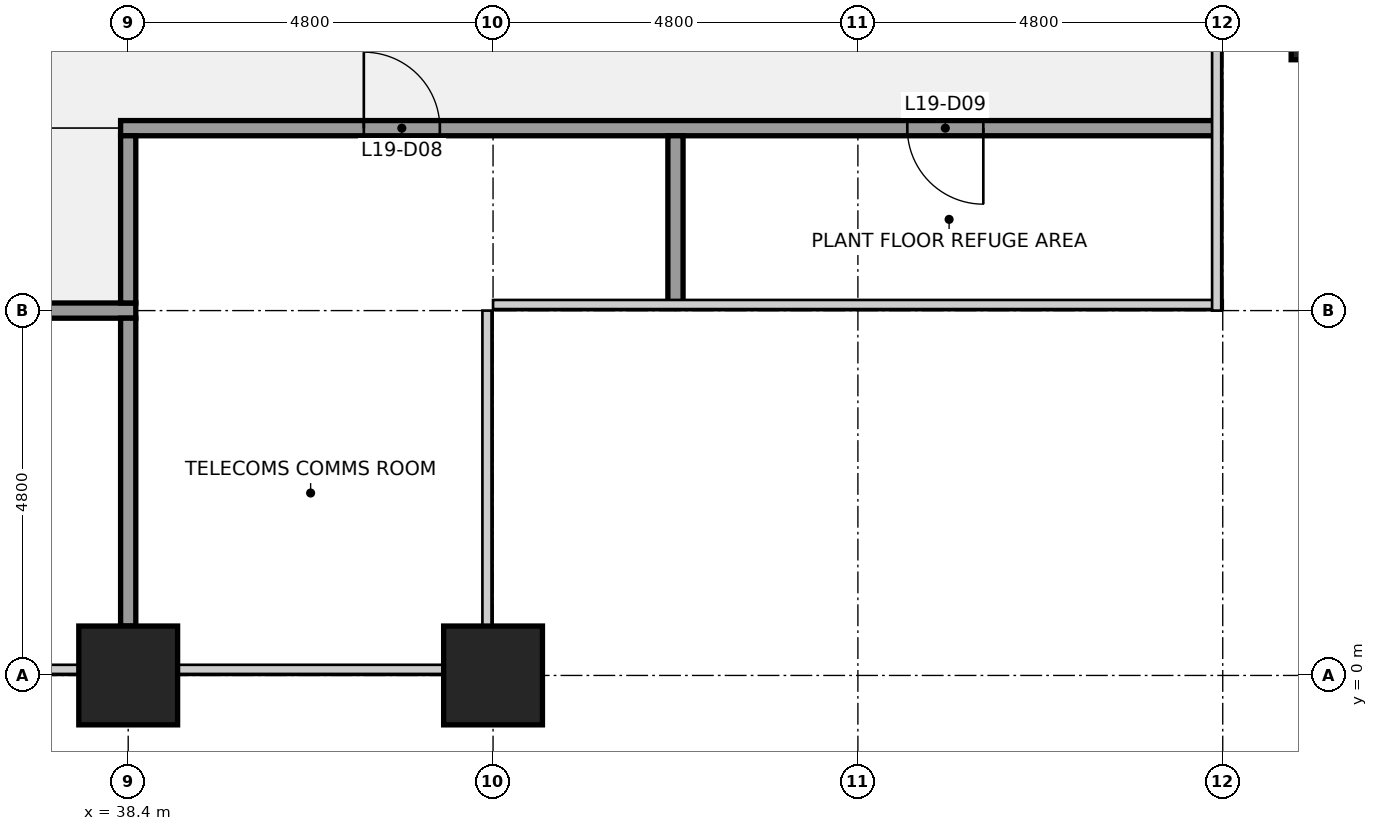
"""IFC4 building model, lengths in metres.
Left out: names, types, materials, properties, quantities, classifications, styles, units other than length and angle.
Written with IfcOpenShell. Run it as: python <this file> out.ifc"""

import sys

from ifc_helpers import new_model, si_unit, direction, frame, frame_2d, origin, origin_2d, place, context, subcontext, project, spatial, rectangle, extrude, element, fill, save


model = new_model("IFC4")
c1 = context("Model", 3, precision=1e-05, world=origin(), true_north=direction((0.0, 1.0)))
c2 = subcontext(c1, "Body", "Model", "MODEL_VIEW")
j1 = project(units=[si_unit("LENGTHUNIT", "METRE"), si_unit("PLANEANGLEUNIT", "RADIAN")], contexts=[c1])
p1 = place(None, origin())
s1 = spatial("IfcSite", under=j1, at=p1, CompositionType="ELEMENT")
p2 = place(p1, origin())
s2 = spatial("IfcBuilding", under=s1, at=p2, CompositionType="ELEMENT")
p3 = place(p2, frame((0.0, 0.0, 87.0)))
s3 = spatial("IfcBuildingStorey", under=s2, at=p3, CompositionType="ELEMENT", Elevation=87.0)
for number, where, z_axis, x_axis in (
    (1, (38.4, 0.0, 0.0), (0.0, 0.0, 1.0), (1.0, 0.0, 0.0)),
    (2, (43.2, 0.0, 0.0), (0.0, 0.0, 1.0), (1.0, 0.0, 0.0)),
):
    element("IfcColumn", number, at=place(p3, frame(where, z_axis=z_axis, x_axis=x_axis)), inside=s3, PredefinedType="COLUMN", context=c2, shape_type="SweptSolid", body=[
        extrude(rectangle(XDim=1.3, YDim=1.3, at=origin_2d()), origin(), (0.0, 0.0, 1.0), 4.5),
    ])
p4 = place(p3, frame((19.1, 4.8, 0.0), z_axis=(0.0, 0.0, 1.0), x_axis=(1.0, 0.0, 0.0)))
e3 = element("IfcWall", 3, at=p4, inside=s3, PredefinedType="PARTITIONING", context=c2, shape_type="SweptSolid", body=[
    extrude(rectangle(XDim=19.4, YDim=0.2, at=frame_2d((9.7, 0.0))), origin(), (0.0, 0.0, 1.0), 2.993),
])
p5 = place(p4, frame((3.2, 0.0, 0.0)))
e4 = element("IfcOpeningElement", 4, at=p5, cuts=e3, PredefinedType="OPENING", context=c2, shape_type="SweptSolid", body=[
    extrude(rectangle(XDim=1.0, YDim=2.1, at=frame_2d((0.5, 1.05))), frame((0.0, 0.11, 0.0), z_axis=(0.0, -1.0, 0.0), x_axis=(1.0, 0.0, 0.0)), (0.0, 0.0, 1.0), 0.22),
])
p6 = place(p4, frame((9.2, 0.0, 0.0)))
e5 = element("IfcOpeningElement", 5, at=p6, cuts=e3, PredefinedType="OPENING", context=c2, shape_type="SweptSolid", body=[
    extrude(rectangle(XDim=1.0, YDim=2.1, at=frame_2d((0.5, 1.05))), frame((0.0, 0.11, 0.0), z_axis=(0.0, -1.0, 0.0), x_axis=(1.0, 0.0, 0.0)), (0.0, 0.0, 1.0), 0.22),
])
p7 = place(p4, frame((15.2, 0.0, 0.0)))
e6 = element("IfcOpeningElement", 6, at=p7, cuts=e3, PredefinedType="OPENING", context=c2, shape_type="SweptSolid", body=[
    extrude(rectangle(XDim=1.0, YDim=2.1, at=frame_2d((0.5, 1.05))), frame((0.0, 0.11, 0.0), z_axis=(0.0, -1.0, 0.0), x_axis=(1.0, 0.0, 0.0)), (0.0, 0.0, 1.0), 0.22),
])
p8 = place(p3, frame((38.3, 7.2, 0.0), z_axis=(0.0, 0.0, 1.0), x_axis=(1.0, 0.0, 0.0)))
e7 = element("IfcWall", 7, at=p8, inside=s3, PredefinedType="PARTITIONING", context=c2, shape_type="SweptSolid", body=[
    extrude(rectangle(XDim=14.4, YDim=0.2, at=frame_2d((7.2, 0.0))), origin(), (0.0, 0.0, 1.0), 2.993),
])
p9 = place(p8, frame((3.2, 0.0, 0.0)))
e8 = element("IfcOpeningElement", 8, at=p9, cuts=e7, PredefinedType="OPENING", context=c2, shape_type="SweptSolid", body=[
    extrude(rectangle(XDim=1.0, YDim=2.1, at=frame_2d((0.5, 1.05))), frame((0.0, 0.11, 0.0), z_axis=(0.0, -1.0, 0.0), x_axis=(1.0, 0.0, 0.0)), (0.0, 0.0, 1.0), 0.22),
])
p10 = place(p8, frame((10.35, 0.0, 0.0)))
e9 = element("IfcOpeningElement", 9, at=p10, cuts=e7, PredefinedType="OPENING", context=c2, shape_type="SweptSolid", body=[
    extrude(rectangle(XDim=1.0, YDim=2.1, at=frame_2d((0.5, 1.05))), frame((0.0, 0.11, 0.0), z_axis=(0.0, -1.0, 0.0), x_axis=(1.0, 0.0, 0.0)), (0.0, 0.0, 1.0), 0.22),
])
p11 = place(p3, frame((38.4, 0.65, 0.0), z_axis=(0.0, 0.0, 1.0), x_axis=(0.0, 1.0, 0.0)))
e10 = element("IfcWall", 10, at=p11, inside=s3, PredefinedType="PARTITIONING", context=c2, shape_type="SweptSolid", body=[
    extrude(rectangle(XDim=4.05, YDim=0.2, at=frame_2d((2.025, 0.0))), origin(), (0.0, 0.0, 1.0), 2.993),
])
for number, where, z_axis, x_axis in (
    (11, (38.4, 4.9, 0.0), (0.0, 0.0, 1.0), (0.0, 1.0, 0.0)),
    (12, (45.6, 4.9, 0.0), (0.0, 0.0, 1.0), (0.0, 1.0, 0.0)),
):
    element("IfcWall", number, at=place(p3, frame(where, z_axis=z_axis, x_axis=x_axis)), inside=s3, PredefinedType="PARTITIONING", context=c2, shape_type="SweptSolid", body=[
        extrude(rectangle(XDim=2.2, YDim=0.2, at=frame_2d((1.1, 0.0))), origin(), (0.0, 0.0, 1.0), 2.993),
    ])
p12 = place(p3, frame((55.2, 8.85, 0.0), z_axis=(0.0, 0.0, 1.0), x_axis=(1.0, 0.0, 0.0)))
e13 = element("IfcColumn", 13, at=p12, inside=s3, PredefinedType="PILASTER", context=c2, shape_type="SweptSolid", body=[
    extrude(rectangle(XDim=3.0, YDim=1.5, at=origin_2d()), origin(), (0.0, 0.0, 1.0), 4.5),
])
for number, where, z_axis, x_axis in (
    (14, (38.4, -1.075, 0.0), (0.0, 0.0, 1.0), (1.0, 0.0, 0.0)),
    (15, (43.2, -1.075, 0.0), (0.0, 0.0, 1.0), (1.0, 0.0, 0.0)),
):
    element("IfcColumn", number, at=place(p3, frame(where, z_axis=z_axis, x_axis=x_axis)), inside=s3, PredefinedType="PILASTER", context=c2, shape_type="SweptSolid", body=[
        extrude(rectangle(XDim=4.2, YDim=0.85, at=origin_2d()), origin(), (0.0, 0.0, 1.0), 4.5),
    ])
p13 = place(p9, origin())
e16 = element("IfcDoor", 16, at=p13, inside=s3, OperationType="SINGLE_SWING_LEFT", PredefinedType="DOOR", context=c2, shape_type="SweptSolid", body=[
    extrude(rectangle(XDim=1.0, YDim=2.1, at=frame_2d((0.5, 1.05))), frame((0.0, 0.025, 0.0), z_axis=(0.0, -1.0, 0.0), x_axis=(1.0, 0.0, 0.0)), (0.0, 0.0, 1.0), 0.05),
])
fill(e8, e16)
p14 = place(p10, origin())
e17 = element("IfcDoor", 17, at=p14, inside=s3, OperationType="SINGLE_SWING_RIGHT", PredefinedType="DOOR", context=c2, shape_type="SweptSolid", body=[
    extrude(rectangle(XDim=1.0, YDim=2.1, at=frame_2d((0.5, 1.05))), frame((0.0, 0.025, 0.0), z_axis=(0.0, -1.0, 0.0), x_axis=(1.0, 0.0, 0.0)), (0.0, 0.0, 1.0), 0.05),
])
fill(e9, e17)
save(model, sys.argv[1])
